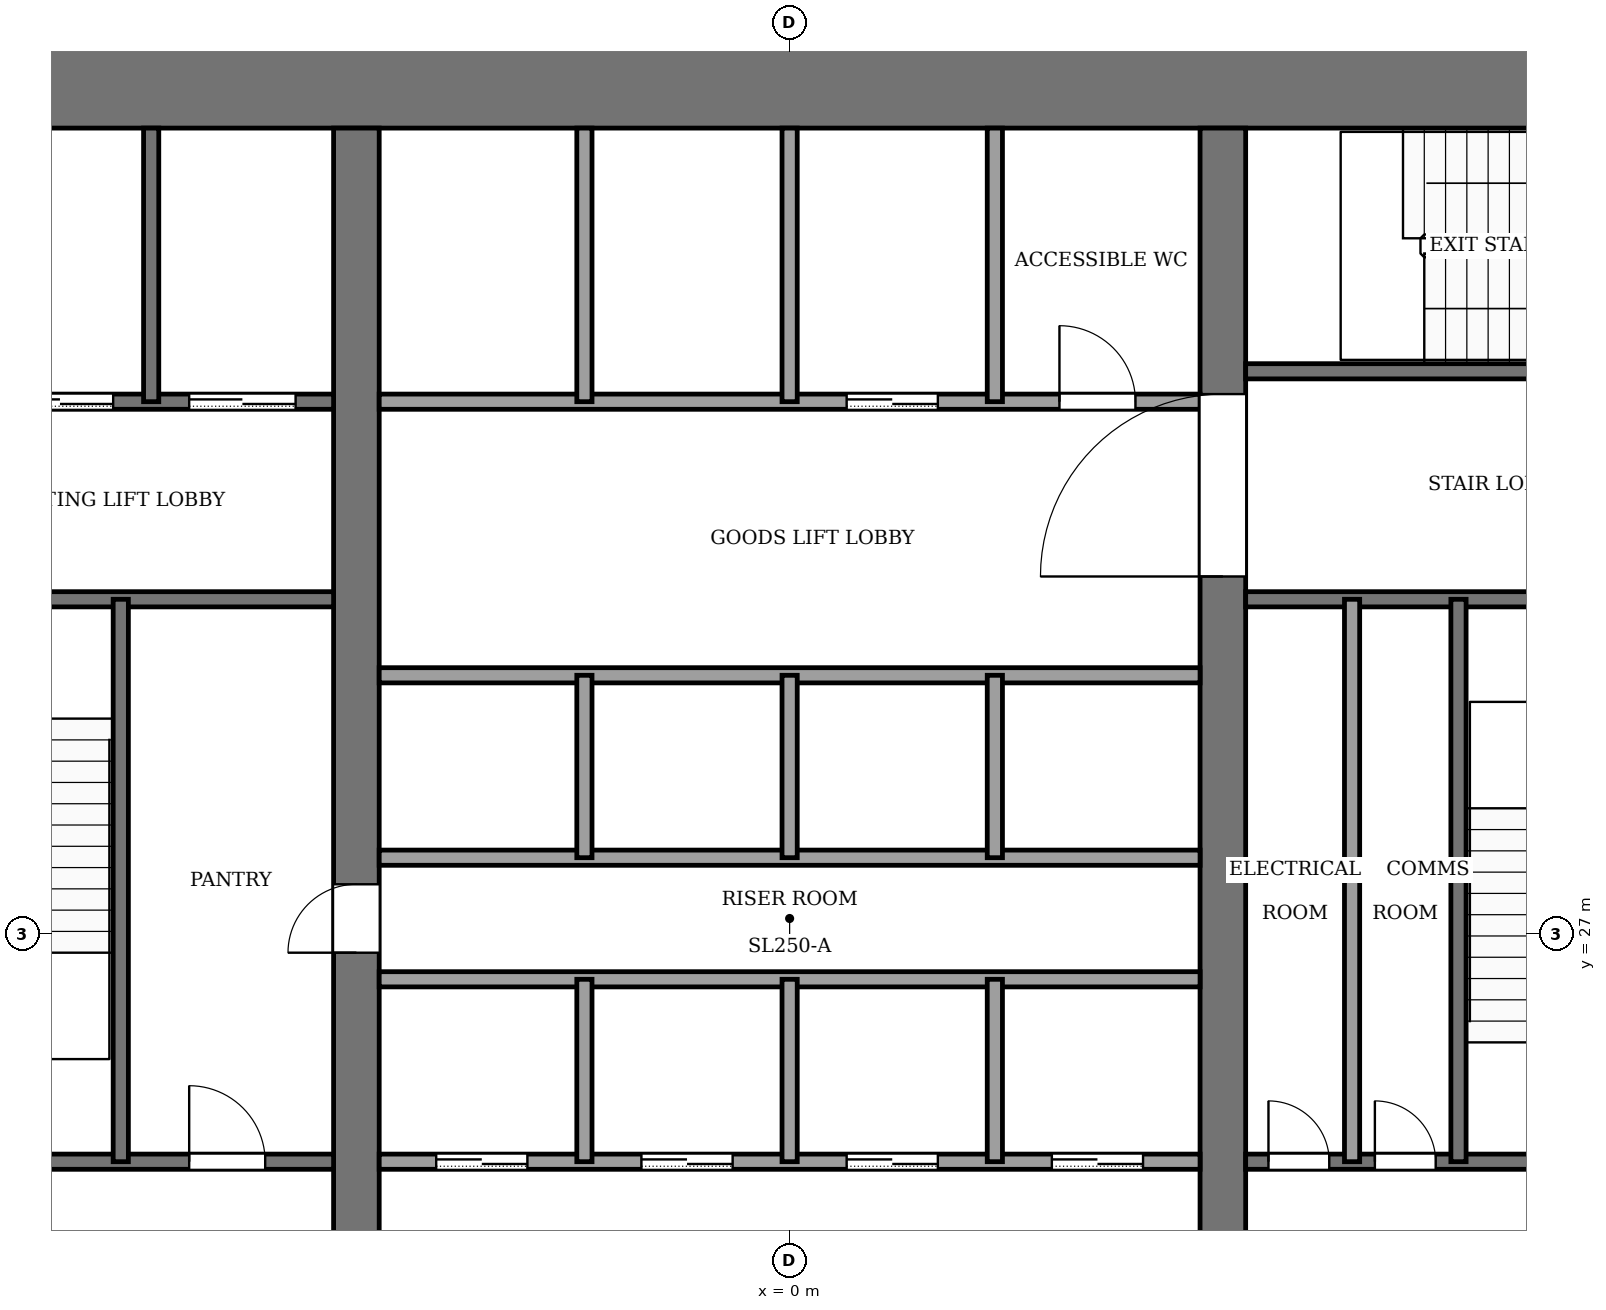
"""IFC4 building model, lengths in metres.
Left out: names, types, materials, properties, quantities, classifications, styles, units other than length and angle.
Written with IfcOpenShell. Run it as: python <this file> out.ifc"""

import sys

from ifc_helpers import new_model, si_unit, direction, frame, frame_2d, origin, place, context, subcontext, project, spatial, rectangle, extrude, element, fill, save


model = new_model("IFC4")
c1 = context("Model", 3, precision=1e-05, world=origin(), true_north=direction((0.0, 1.0)))
c2 = subcontext(c1, "Body", "Model", "MODEL_VIEW")
j1 = project(units=[si_unit("LENGTHUNIT", "METRE"), si_unit("PLANEANGLEUNIT", "RADIAN")], contexts=[c1])
p1 = place(None, origin())
s1 = spatial("IfcSite", under=j1, at=p1, CompositionType="ELEMENT")
p2 = place(p1, origin())
s2 = spatial("IfcBuilding", under=s1, at=p2, CompositionType="ELEMENT")
p3 = place(p2, frame((0.0, 0.0, 42.0)))
s3 = spatial("IfcBuildingStorey", under=s2, at=p3, CompositionType="ELEMENT", Elevation=42.0)
p4 = place(p3, frame((-14.0, 38.3, -0.13), z_axis=(0.0, 0.0, 1.0), x_axis=(1.0, 0.0, 0.0)))
e1 = element("IfcWall", 1, at=p4, inside=s3, PredefinedType="SHEAR", context=c2, shape_type="SweptSolid", body=[
    extrude(rectangle(XDim=28.0, YDim=1.4, at=frame_2d((14.0, 0.0))), origin(), (0.0, 0.0, 1.0), 4.0),
])
p5 = place(p3, frame((-5.7, 18.4, -0.13), z_axis=(0.0, 0.0, 1.0), x_axis=(0.0, 1.0, 0.0)))
e2 = element("IfcWall", 2, at=p5, inside=s3, PredefinedType="SHEAR", context=c2, shape_type="SweptSolid", body=[
    extrude(rectangle(XDim=19.2, YDim=0.6, at=frame_2d((9.6, 0.0))), origin(), (0.0, 0.0, 1.0), 4.0),
])
p6 = place(p5, frame((8.35, 0.0, 0.13)))
e3 = element("IfcOpeningElement", 3, at=p6, cuts=e2, PredefinedType="OPENING", context=c2, shape_type="SweptSolid", body=[
    extrude(rectangle(XDim=0.9, YDim=2.1, at=frame_2d((0.45, 1.05))), frame((0.0, 0.31, 0.0), z_axis=(0.0, -1.0, 0.0), x_axis=(1.0, 0.0, 0.0)), (0.0, 0.0, 1.0), 0.62),
])
p7 = place(p3, frame((5.7, 18.4, -0.13), z_axis=(0.0, 0.0, 1.0), x_axis=(0.0, 1.0, 0.0)))
e4 = element("IfcWall", 4, at=p7, inside=s3, PredefinedType="SHEAR", context=c2, shape_type="SweptSolid", body=[
    extrude(rectangle(XDim=19.2, YDim=0.6, at=frame_2d((9.6, 0.0))), origin(), (0.0, 0.0, 1.0), 4.0),
])
p8 = place(p7, frame((13.3, 0.0, 0.13)))
e5 = element("IfcOpeningElement", 5, at=p8, cuts=e4, PredefinedType="OPENING", context=c2, shape_type="SweptSolid", body=[
    extrude(rectangle(XDim=2.4, YDim=2.4, at=frame_2d((1.2, 1.2))), frame((0.0, 0.31, 0.0), z_axis=(0.0, -1.0, 0.0), x_axis=(1.0, 0.0, 0.0)), (0.0, 0.0, 1.0), 0.62),
])
p9 = place(p3, frame((-12.6, 24.0, 0.0), z_axis=(0.0, 0.0, 1.0), x_axis=(1.0, 0.0, 0.0)))
e6 = element("IfcWall", 6, at=p9, inside=s3, PredefinedType="PARTITIONING", context=c2, shape_type="SweptSolid", body=[
    extrude(rectangle(XDim=6.6, YDim=0.2, at=frame_2d((3.3, 0.0))), origin(), (0.0, 0.0, 1.0), 3.87),
])
p10 = place(p9, frame((4.7, 0.0, 0.0)))
e7 = element("IfcOpeningElement", 7, at=p10, cuts=e6, PredefinedType="OPENING", context=c2, shape_type="SweptSolid", body=[
    extrude(rectangle(XDim=1.0, YDim=2.1, at=frame_2d((0.5, 1.05))), frame((0.0, 0.11, 0.0), z_axis=(0.0, -1.0, 0.0), x_axis=(1.0, 0.0, 0.0)), (0.0, 0.0, 1.0), 0.22),
])
p11 = place(p3, frame((-5.4, 24.0, 0.0), z_axis=(0.0, 0.0, 1.0), x_axis=(1.0, 0.0, 0.0)))
e8 = element("IfcWall", 8, at=p11, inside=s3, PredefinedType="PARTITIONING", context=c2, shape_type="SweptSolid", body=[
    extrude(rectangle(XDim=10.8, YDim=0.2, at=frame_2d((5.4, 0.0))), origin(), (0.0, 0.0, 1.0), 3.87),
])
p12 = place(p11, frame((0.75, 0.0, 0.0)))
e9 = element("IfcOpeningElement", 9, at=p12, cuts=e8, PredefinedType="OPENING", context=c2, shape_type="SweptSolid", body=[
    extrude(rectangle(XDim=1.2, YDim=2.2, at=frame_2d((0.6, 1.1))), frame((0.0, 0.11, 0.0), z_axis=(0.0, -1.0, 0.0), x_axis=(1.0, 0.0, 0.0)), (0.0, 0.0, 1.0), 0.22),
])
p13 = place(p11, frame((3.45, 0.0, 0.0)))
e10 = element("IfcOpeningElement", 10, at=p13, cuts=e8, PredefinedType="OPENING", context=c2, shape_type="SweptSolid", body=[
    extrude(rectangle(XDim=1.2, YDim=2.2, at=frame_2d((0.6, 1.1))), frame((0.0, 0.11, 0.0), z_axis=(0.0, -1.0, 0.0), x_axis=(1.0, 0.0, 0.0)), (0.0, 0.0, 1.0), 0.22),
])
p14 = place(p11, frame((6.15, 0.0, 0.0)))
e11 = element("IfcOpeningElement", 11, at=p14, cuts=e8, PredefinedType="OPENING", context=c2, shape_type="SweptSolid", body=[
    extrude(rectangle(XDim=1.2, YDim=2.2, at=frame_2d((0.6, 1.1))), frame((0.0, 0.11, 0.0), z_axis=(0.0, -1.0, 0.0), x_axis=(1.0, 0.0, 0.0)), (0.0, 0.0, 1.0), 0.22),
])
p15 = place(p11, frame((8.85, 0.0, 0.0)))
e12 = element("IfcOpeningElement", 12, at=p15, cuts=e8, PredefinedType="OPENING", context=c2, shape_type="SweptSolid", body=[
    extrude(rectangle(XDim=1.2, YDim=2.2, at=frame_2d((0.6, 1.1))), frame((0.0, 0.11, 0.0), z_axis=(0.0, -1.0, 0.0), x_axis=(1.0, 0.0, 0.0)), (0.0, 0.0, 1.0), 0.22),
])
p16 = place(p3, frame((6.0, 24.0, 0.0), z_axis=(0.0, 0.0, 1.0), x_axis=(1.0, 0.0, 0.0)))
e13 = element("IfcWall", 13, at=p16, inside=s3, PredefinedType="PARTITIONING", context=c2, shape_type="SweptSolid", body=[
    extrude(rectangle(XDim=6.6, YDim=0.2, at=frame_2d((3.3, 0.0))), origin(), (0.0, 0.0, 1.0), 3.87),
])
p17 = place(p16, frame((0.3, 0.0, 0.0)))
e14 = element("IfcOpeningElement", 14, at=p17, cuts=e13, PredefinedType="OPENING", context=c2, shape_type="SweptSolid", body=[
    extrude(rectangle(XDim=0.8, YDim=2.1, at=frame_2d((0.4, 1.05))), frame((0.0, 0.11, 0.0), z_axis=(0.0, -1.0, 0.0), x_axis=(1.0, 0.0, 0.0)), (0.0, 0.0, 1.0), 0.22),
])
p18 = place(p16, frame((1.7, 0.0, 0.0)))
e15 = element("IfcOpeningElement", 15, at=p18, cuts=e13, PredefinedType="OPENING", context=c2, shape_type="SweptSolid", body=[
    extrude(rectangle(XDim=0.8, YDim=2.1, at=frame_2d((0.4, 1.05))), frame((0.0, 0.11, 0.0), z_axis=(0.0, -1.0, 0.0), x_axis=(1.0, 0.0, 0.0)), (0.0, 0.0, 1.0), 0.22),
])
p19 = place(p16, frame((4.4, 0.0, 0.0)))
e16 = element("IfcOpeningElement", 16, at=p19, cuts=e13, PredefinedType="OPENING", context=c2, shape_type="SweptSolid", body=[
    extrude(rectangle(XDim=1.2, YDim=2.2, at=frame_2d((0.6, 1.1))), frame((0.0, 0.11, 0.0), z_axis=(0.0, -1.0, 0.0), x_axis=(1.0, 0.0, 0.0)), (0.0, 0.0, 1.0), 0.22),
])
for number, where, z_axis, x_axis in (
    (17, (-5.4, 26.4, 0.0), (0.0, 0.0, 1.0), (1.0, 0.0, 0.0)),
    (18, (-5.4, 28.0, 0.0), (0.0, 0.0, 1.0), (1.0, 0.0, 0.0)),
    (19, (-5.4, 30.4, 0.0), (0.0, 0.0, 1.0), (1.0, 0.0, 0.0)),
):
    element("IfcWall", number, at=place(p3, frame(where, z_axis=z_axis, x_axis=x_axis)), inside=s3, PredefinedType="PARTITIONING", context=c2, shape_type="SweptSolid", body=[
        extrude(rectangle(XDim=10.8, YDim=0.2, at=frame_2d((5.4, 0.0))), origin(), (0.0, 0.0, 1.0), 3.87),
    ])
p20 = place(p3, frame((-12.6, 31.4, 0.0), z_axis=(0.0, 0.0, 1.0), x_axis=(1.0, 0.0, 0.0)))
e20 = element("IfcWall", 20, at=p20, inside=s3, PredefinedType="PARTITIONING", context=c2, shape_type="SweptSolid", body=[
    extrude(rectangle(XDim=6.6, YDim=0.2, at=frame_2d((3.3, 0.0))), origin(), (0.0, 0.0, 1.0), 3.87),
])
p21 = place(p20, frame((1.0, 0.0, 0.0)))
e21 = element("IfcOpeningElement", 21, at=p21, cuts=e20, PredefinedType="OPENING", context=c2, shape_type="SweptSolid", body=[
    extrude(rectangle(XDim=1.2, YDim=2.2, at=frame_2d((0.6, 1.1))), frame((0.0, 0.11, 0.0), z_axis=(0.0, -1.0, 0.0), x_axis=(1.0, 0.0, 0.0)), (0.0, 0.0, 1.0), 0.22),
])
p22 = place(p3, frame((6.0, 31.4, 0.0), z_axis=(0.0, 0.0, 1.0), x_axis=(1.0, 0.0, 0.0)))
e22 = element("IfcWall", 22, at=p22, inside=s3, PredefinedType="PARTITIONING", context=c2, shape_type="SweptSolid", body=[
    extrude(rectangle(XDim=6.6, YDim=0.2, at=frame_2d((3.3, 0.0))), origin(), (0.0, 0.0, 1.0), 3.87),
])
p23 = place(p3, frame((-12.6, 34.0, 0.0), z_axis=(0.0, 0.0, 1.0), x_axis=(1.0, 0.0, 0.0)))
e23 = element("IfcWall", 23, at=p23, inside=s3, PredefinedType="PARTITIONING", context=c2, shape_type="SweptSolid", body=[
    extrude(rectangle(XDim=6.6, YDim=0.2, at=frame_2d((3.3, 0.0))), origin(), (0.0, 0.0, 1.0), 3.87),
])
p24 = place(p23, frame((4.7, 0.0, 0.0)))
e24 = element("IfcOpeningElement", 24, at=p24, cuts=e23, PredefinedType="OPENING", context=c2, shape_type="SweptSolid", body=[
    extrude(rectangle(XDim=1.4, YDim=2.2, at=frame_2d((0.7, 1.1))), frame((0.0, 0.11, 0.0), z_axis=(0.0, -1.0, 0.0), x_axis=(1.0, 0.0, 0.0)), (0.0, 0.0, 1.0), 0.22),
])
p25 = place(p23, frame((2.3, 0.0, 0.0)))
e25 = element("IfcOpeningElement", 25, at=p25, cuts=e23, PredefinedType="OPENING", context=c2, shape_type="SweptSolid", body=[
    extrude(rectangle(XDim=1.4, YDim=2.2, at=frame_2d((0.7, 1.1))), frame((0.0, 0.11, 0.0), z_axis=(0.0, -1.0, 0.0), x_axis=(1.0, 0.0, 0.0)), (0.0, 0.0, 1.0), 0.22),
])
p26 = place(p23, frame((0.45, 0.0, 0.0)))
e26 = element("IfcOpeningElement", 26, at=p26, cuts=e23, PredefinedType="OPENING", context=c2, shape_type="SweptSolid", body=[
    extrude(rectangle(XDim=0.9, YDim=2.1, at=frame_2d((0.45, 1.05))), frame((0.0, 0.11, 0.0), z_axis=(0.0, -1.0, 0.0), x_axis=(1.0, 0.0, 0.0)), (0.0, 0.0, 1.0), 0.22),
])
p27 = place(p3, frame((-5.4, 34.0, 0.0), z_axis=(0.0, 0.0, 1.0), x_axis=(1.0, 0.0, 0.0)))
e27 = element("IfcWall", 27, at=p27, inside=s3, PredefinedType="PARTITIONING", context=c2, shape_type="SweptSolid", body=[
    extrude(rectangle(XDim=10.8, YDim=0.2, at=frame_2d((5.4, 0.0))), origin(), (0.0, 0.0, 1.0), 3.87),
])
p28 = place(p27, frame((6.15, 0.0, 0.0)))
e28 = element("IfcOpeningElement", 28, at=p28, cuts=e27, PredefinedType="OPENING", context=c2, shape_type="SweptSolid", body=[
    extrude(rectangle(XDim=1.2, YDim=2.2, at=frame_2d((0.6, 1.1))), frame((0.0, 0.11, 0.0), z_axis=(0.0, -1.0, 0.0), x_axis=(1.0, 0.0, 0.0)), (0.0, 0.0, 1.0), 0.22),
])
p29 = place(p27, frame((8.95, 0.0, 0.0)))
e29 = element("IfcOpeningElement", 29, at=p29, cuts=e27, PredefinedType="OPENING", context=c2, shape_type="SweptSolid", body=[
    extrude(rectangle(XDim=1.0, YDim=2.1, at=frame_2d((0.5, 1.05))), frame((0.0, 0.11, 0.0), z_axis=(0.0, -1.0, 0.0), x_axis=(1.0, 0.0, 0.0)), (0.0, 0.0, 1.0), 0.22),
])
p30 = place(p3, frame((6.0, 34.4, 0.0), z_axis=(0.0, 0.0, 1.0), x_axis=(1.0, 0.0, 0.0)))
e30 = element("IfcWall", 30, at=p30, inside=s3, PredefinedType="PARTITIONING", context=c2, shape_type="SweptSolid", body=[
    extrude(rectangle(XDim=6.6, YDim=0.2, at=frame_2d((3.3, 0.0))), origin(), (0.0, 0.0, 1.0), 3.87),
])
p31 = place(p30, frame((4.8, 0.0, 0.0)))
e31 = element("IfcOpeningElement", 31, at=p31, cuts=e30, PredefinedType="OPENING", context=c2, shape_type="SweptSolid", body=[
    extrude(rectangle(XDim=1.2, YDim=2.2, at=frame_2d((0.6, 1.1))), frame((0.0, 0.11, 0.0), z_axis=(0.0, -1.0, 0.0), x_axis=(1.0, 0.0, 0.0)), (0.0, 0.0, 1.0), 0.22),
])
p32 = place(p3, frame((-8.8, 24.0, 0.0), z_axis=(0.0, 0.0, 1.0), x_axis=(0.0, 1.0, 0.0)))
e32 = element("IfcWall", 32, at=p32, inside=s3, PredefinedType="PARTITIONING", context=c2, shape_type="SweptSolid", body=[
    extrude(rectangle(XDim=7.4, YDim=0.2, at=frame_2d((3.7, 0.0))), origin(), (0.0, 0.0, 1.0), 3.87),
])
p33 = place(p3, frame((-8.4, 34.0, 0.0), z_axis=(0.0, 0.0, 1.0), x_axis=(0.0, 1.0, 0.0)))
e33 = element("IfcWall", 33, at=p33, inside=s3, PredefinedType="PARTITIONING", context=c2, shape_type="SweptSolid", body=[
    extrude(rectangle(XDim=3.6, YDim=0.2, at=frame_2d((1.8, 0.0))), origin(), (0.0, 0.0, 1.0), 3.87),
])
for number, where, z_axis, x_axis in (
    (34, (-2.7, 24.0, 0.0), (0.0, 0.0, 1.0), (0.0, 1.0, 0.0)),
    (35, (-2.7, 28.0, 0.0), (0.0, 0.0, 1.0), (0.0, 1.0, 0.0)),
):
    element("IfcWall", number, at=place(p3, frame(where, z_axis=z_axis, x_axis=x_axis)), inside=s3, PredefinedType="PARTITIONING", context=c2, shape_type="SweptSolid", body=[
        extrude(rectangle(XDim=2.4, YDim=0.2, at=frame_2d((1.2, 0.0))), origin(), (0.0, 0.0, 1.0), 3.87),
    ])
p34 = place(p3, frame((-2.7, 34.0, 0.0), z_axis=(0.0, 0.0, 1.0), x_axis=(0.0, 1.0, 0.0)))
e36 = element("IfcWall", 36, at=p34, inside=s3, PredefinedType="PARTITIONING", context=c2, shape_type="SweptSolid", body=[
    extrude(rectangle(XDim=3.6, YDim=0.2, at=frame_2d((1.8, 0.0))), origin(), (0.0, 0.0, 1.0), 3.87),
])
for number, where, z_axis, x_axis in (
    (37, (0.0, 24.0, 0.0), (0.0, 0.0, 1.0), (0.0, 1.0, 0.0)),
    (38, (0.0, 28.0, 0.0), (0.0, 0.0, 1.0), (0.0, 1.0, 0.0)),
):
    element("IfcWall", number, at=place(p3, frame(where, z_axis=z_axis, x_axis=x_axis)), inside=s3, PredefinedType="PARTITIONING", context=c2, shape_type="SweptSolid", body=[
        extrude(rectangle(XDim=2.4, YDim=0.2, at=frame_2d((1.2, 0.0))), origin(), (0.0, 0.0, 1.0), 3.87),
    ])
p35 = place(p3, frame((0.0, 34.0, 0.0), z_axis=(0.0, 0.0, 1.0), x_axis=(0.0, 1.0, 0.0)))
e39 = element("IfcWall", 39, at=p35, inside=s3, PredefinedType="PARTITIONING", context=c2, shape_type="SweptSolid", body=[
    extrude(rectangle(XDim=3.6, YDim=0.2, at=frame_2d((1.8, 0.0))), origin(), (0.0, 0.0, 1.0), 3.87),
])
for number, where, z_axis, x_axis in (
    (40, (2.7, 24.0, 0.0), (0.0, 0.0, 1.0), (0.0, 1.0, 0.0)),
    (41, (2.7, 28.0, 0.0), (0.0, 0.0, 1.0), (0.0, 1.0, 0.0)),
):
    element("IfcWall", number, at=place(p3, frame(where, z_axis=z_axis, x_axis=x_axis)), inside=s3, PredefinedType="PARTITIONING", context=c2, shape_type="SweptSolid", body=[
        extrude(rectangle(XDim=2.4, YDim=0.2, at=frame_2d((1.2, 0.0))), origin(), (0.0, 0.0, 1.0), 3.87),
    ])
p36 = place(p3, frame((2.7, 34.0, 0.0), z_axis=(0.0, 0.0, 1.0), x_axis=(0.0, 1.0, 0.0)))
e42 = element("IfcWall", 42, at=p36, inside=s3, PredefinedType="PARTITIONING", context=c2, shape_type="SweptSolid", body=[
    extrude(rectangle(XDim=3.6, YDim=0.2, at=frame_2d((1.8, 0.0))), origin(), (0.0, 0.0, 1.0), 3.87),
])
for number, where, z_axis, x_axis in (
    (43, (7.4, 24.0, 0.0), (0.0, 0.0, 1.0), (0.0, 1.0, 0.0)),
    (44, (8.8, 24.0, 0.0), (0.0, 0.0, 1.0), (0.0, 1.0, 0.0)),
):
    element("IfcWall", number, at=place(p3, frame(where, z_axis=z_axis, x_axis=x_axis)), inside=s3, PredefinedType="PARTITIONING", context=c2, shape_type="SweptSolid", body=[
        extrude(rectangle(XDim=7.4, YDim=0.2, at=frame_2d((3.7, 0.0))), origin(), (0.0, 0.0, 1.0), 3.87),
    ])
p37 = place(p12, origin())
e45 = element("IfcDoor", 45, at=p37, inside=s3, OperationType="SLIDING_TO_LEFT", PredefinedType="DOOR", context=c2, shape_type="SweptSolid", body=[
    extrude(rectangle(XDim=1.2, YDim=2.2, at=frame_2d((0.6, 1.1))), frame((0.0, 0.025, 0.0), z_axis=(0.0, -1.0, 0.0), x_axis=(1.0, 0.0, 0.0)), (0.0, 0.0, 1.0), 0.05),
])
fill(e9, e45)
p38 = place(p13, origin())
e46 = element("IfcDoor", 46, at=p38, inside=s3, OperationType="SLIDING_TO_LEFT", PredefinedType="DOOR", context=c2, shape_type="SweptSolid", body=[
    extrude(rectangle(XDim=1.2, YDim=2.2, at=frame_2d((0.6, 1.1))), frame((0.0, 0.025, 0.0), z_axis=(0.0, -1.0, 0.0), x_axis=(1.0, 0.0, 0.0)), (0.0, 0.0, 1.0), 0.05),
])
fill(e10, e46)
p39 = place(p14, origin())
e47 = element("IfcDoor", 47, at=p39, inside=s3, OperationType="SLIDING_TO_LEFT", PredefinedType="DOOR", context=c2, shape_type="SweptSolid", body=[
    extrude(rectangle(XDim=1.2, YDim=2.2, at=frame_2d((0.6, 1.1))), frame((0.0, 0.025, 0.0), z_axis=(0.0, -1.0, 0.0), x_axis=(1.0, 0.0, 0.0)), (0.0, 0.0, 1.0), 0.05),
])
fill(e11, e47)
p40 = place(p15, origin())
e48 = element("IfcDoor", 48, at=p40, inside=s3, OperationType="SLIDING_TO_LEFT", PredefinedType="DOOR", context=c2, shape_type="SweptSolid", body=[
    extrude(rectangle(XDim=1.2, YDim=2.2, at=frame_2d((0.6, 1.1))), frame((0.0, 0.025, 0.0), z_axis=(0.0, -1.0, 0.0), x_axis=(1.0, 0.0, 0.0)), (0.0, 0.0, 1.0), 0.05),
])
fill(e12, e48)
p41 = place(p28, origin())
e49 = element("IfcDoor", 49, at=p41, inside=s3, OperationType="SLIDING_TO_LEFT", PredefinedType="DOOR", context=c2, shape_type="SweptSolid", body=[
    extrude(rectangle(XDim=1.2, YDim=2.2, at=frame_2d((0.6, 1.1))), frame((0.0, 0.025, 0.0), z_axis=(0.0, -1.0, 0.0), x_axis=(1.0, 0.0, 0.0)), (0.0, 0.0, 1.0), 0.05),
])
fill(e28, e49)
p42 = place(p24, origin())
e50 = element("IfcDoor", 50, at=p42, inside=s3, OperationType="SLIDING_TO_LEFT", PredefinedType="DOOR", context=c2, shape_type="SweptSolid", body=[
    extrude(rectangle(XDim=1.4, YDim=2.2, at=frame_2d((0.7, 1.1))), frame((0.0, 0.025, 0.0), z_axis=(0.0, -1.0, 0.0), x_axis=(1.0, 0.0, 0.0)), (0.0, 0.0, 1.0), 0.05),
])
fill(e24, e50)
p43 = place(p25, origin())
e51 = element("IfcDoor", 51, at=p43, inside=s3, OperationType="SLIDING_TO_LEFT", PredefinedType="DOOR", context=c2, shape_type="SweptSolid", body=[
    extrude(rectangle(XDim=1.4, YDim=2.2, at=frame_2d((0.7, 1.1))), frame((0.0, 0.025, 0.0), z_axis=(0.0, -1.0, 0.0), x_axis=(1.0, 0.0, 0.0)), (0.0, 0.0, 1.0), 0.05),
])
fill(e25, e51)
p44 = place(p10, origin())
e52 = element("IfcDoor", 52, at=p44, inside=s3, OperationType="SINGLE_SWING_LEFT", PredefinedType="DOOR", context=c2, shape_type="SweptSolid", body=[
    extrude(rectangle(XDim=1.0, YDim=2.1, at=frame_2d((0.5, 1.05))), frame((0.0, 0.025, 0.0), z_axis=(0.0, -1.0, 0.0), x_axis=(1.0, 0.0, 0.0)), (0.0, 0.0, 1.0), 0.05),
])
fill(e7, e52)
p45 = place(p17, origin())
e53 = element("IfcDoor", 53, at=p45, inside=s3, OperationType="SINGLE_SWING_LEFT", PredefinedType="DOOR", context=c2, shape_type="SweptSolid", body=[
    extrude(rectangle(XDim=0.8, YDim=2.1, at=frame_2d((0.4, 1.05))), frame((0.0, 0.025, 0.0), z_axis=(0.0, -1.0, 0.0), x_axis=(1.0, 0.0, 0.0)), (0.0, 0.0, 1.0), 0.05),
])
fill(e14, e53)
p46 = place(p18, origin())
e54 = element("IfcDoor", 54, at=p46, inside=s3, OperationType="SINGLE_SWING_RIGHT", PredefinedType="DOOR", context=c2, shape_type="SweptSolid", body=[
    extrude(rectangle(XDim=0.8, YDim=2.1, at=frame_2d((0.4, 1.05))), frame((0.0, 0.025, 0.0), z_axis=(0.0, -1.0, 0.0), x_axis=(1.0, 0.0, 0.0)), (0.0, 0.0, 1.0), 0.05),
])
fill(e15, e54)
p47 = place(p29, origin())
e55 = element("IfcDoor", 55, at=p47, inside=s3, OperationType="SINGLE_SWING_LEFT", PredefinedType="DOOR", context=c2, shape_type="SweptSolid", body=[
    extrude(rectangle(XDim=1.0, YDim=2.1, at=frame_2d((0.5, 1.05))), frame((0.0, 0.025, 0.0), z_axis=(0.0, -1.0, 0.0), x_axis=(1.0, 0.0, 0.0)), (0.0, 0.0, 1.0), 0.05),
])
fill(e29, e55)
p48 = place(p6, origin())
e56 = element("IfcDoor", 56, at=p48, inside=s3, OperationType="SINGLE_SWING_RIGHT", PredefinedType="DOOR", context=c2, shape_type="SweptSolid", body=[
    extrude(rectangle(XDim=0.9, YDim=2.1, at=frame_2d((0.45, 1.05))), frame((0.0, 0.025, 0.0), z_axis=(0.0, -1.0, 0.0), x_axis=(1.0, 0.0, 0.0)), (0.0, 0.0, 1.0), 0.05),
])
fill(e3, e56)
p49 = place(p8, origin())
e57 = element("IfcDoor", 57, at=p49, inside=s3, OperationType="DOUBLE_DOOR_SINGLE_SWING", PredefinedType="DOOR", context=c2, shape_type="SweptSolid", body=[
    extrude(rectangle(XDim=2.4, YDim=2.4, at=frame_2d((1.2, 1.2))), frame((0.0, 0.025, 0.0), z_axis=(0.0, -1.0, 0.0), x_axis=(1.0, 0.0, 0.0)), (0.0, 0.0, 1.0), 0.05),
])
fill(e5, e57)
save(model, sys.argv[1])
